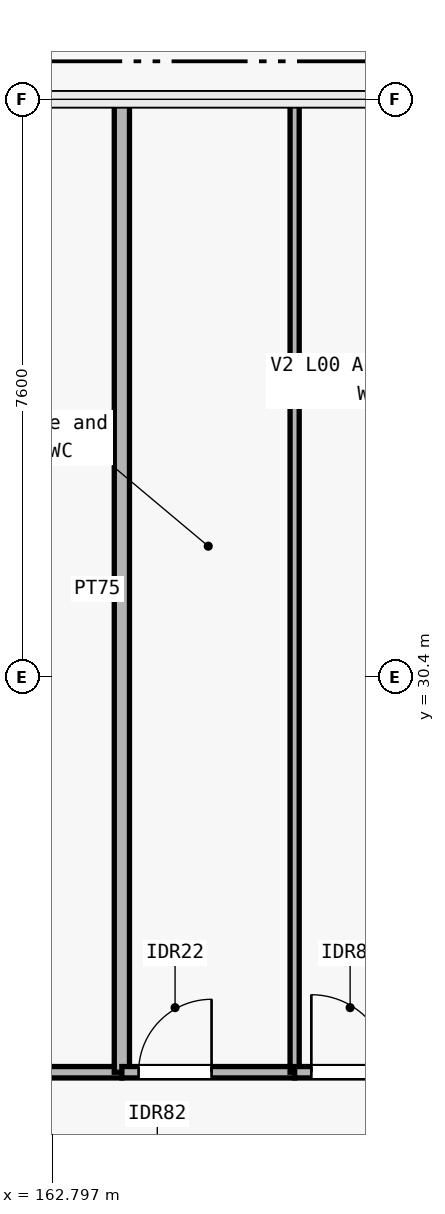
"""IFC4 building model, lengths in metres.
Left out: names, types, materials, properties, quantities, classifications, styles, units other than length and angle.
Written with IfcOpenShell. Run it as: python <this file> out.ifc"""

import sys

from ifc_helpers import new_model, si_unit, direction, frame, frame_2d, origin, place, context, subcontext, project, spatial, rectangle, extrude, element, fill, save


model = new_model("IFC4")
c1 = context("Model", 3, precision=1e-05, world=origin(), true_north=direction((0.0, 1.0)))
c2 = subcontext(c1, "Body", "Model", "MODEL_VIEW")
j1 = project(units=[si_unit("LENGTHUNIT", "METRE"), si_unit("PLANEANGLEUNIT", "RADIAN")], contexts=[c1])
p1 = place(None, origin())
s1 = spatial("IfcSite", under=j1, at=p1, CompositionType="ELEMENT")
p2 = place(p1, origin())
s2 = spatial("IfcBuilding", under=s1, at=p2, CompositionType="ELEMENT")
p3 = place(p2, origin())
s3 = spatial("IfcBuildingStorey", under=s2, at=p3, CompositionType="ELEMENT", Elevation=0.0)
p4 = place(p3, frame((155.033, 25.2, 0.0), z_axis=(0.0, 0.0, 1.0), x_axis=(1.0, 0.0, 0.0)))
e1 = element("IfcWall", 1, at=p4, inside=s3, PredefinedType="PARTITIONING", context=c2, shape_type="SweptSolid", body=[
    extrude(rectangle(XDim=8.68, YDim=0.15, at=frame_2d((4.34, 0.0))), origin(), (0.0, 0.0, 1.0), 4.275),
])
p5 = place(p4, frame((0.22, 0.0, 0.0)))
e2 = element("IfcOpeningElement", 2, at=p5, cuts=e1, PredefinedType="OPENING", context=c2, shape_type="SweptSolid", body=[
    extrude(rectangle(XDim=0.9, YDim=2.1, at=frame_2d((0.45, 1.05))), frame((0.0, 0.085, 0.0), z_axis=(0.0, -1.0, 0.0), x_axis=(1.0, 0.0, 0.0)), (0.0, 0.0, 1.0), 0.17),
])
p6 = place(p3, frame((163.713, 25.2, 0.0), z_axis=(0.0, 0.0, 1.0), x_axis=(0.0, 1.0, 0.0)))
e3 = element("IfcWall", 3, at=p6, inside=s3, PredefinedType="PARTITIONING", context=c2, shape_type="SweptSolid", body=[
    extrude(rectangle(XDim=12.72, YDim=0.2, at=frame_2d((6.36, 0.0))), origin(), (0.0, 0.0, 1.0), 4.325),
])
p7 = place(p3, frame((163.713, 25.2, 0.0), z_axis=(0.0, 0.0, 1.0), x_axis=(1.0, 0.0, 0.0)))
e4 = element("IfcWall", 4, at=p7, inside=s3, PredefinedType="PARTITIONING", context=c2, shape_type="SweptSolid", body=[
    extrude(rectangle(XDim=2.273, YDim=0.15, at=frame_2d((1.137, 0.0))), origin(), (0.0, 0.0, 1.0), 4.485),
])
p8 = place(p7, frame((0.22, 0.0, 0.0)))
e5 = element("IfcOpeningElement", 5, at=p8, cuts=e4, PredefinedType="OPENING", context=c2, shape_type="SweptSolid", body=[
    extrude(rectangle(XDim=0.96, YDim=2.1, at=frame_2d((0.48, 1.05))), frame((0.0, 0.085, 0.0), z_axis=(0.0, -1.0, 0.0), x_axis=(1.0, 0.0, 0.0)), (0.0, 0.0, 1.0), 0.17),
])
p9 = place(p3, frame((165.986, 25.2, 0.0), z_axis=(0.0, 0.0, 1.0), x_axis=(0.0, 1.0, 0.0)))
e6 = element("IfcWall", 6, at=p9, inside=s3, PredefinedType="PARTITIONING", context=c2, shape_type="SweptSolid", body=[
    extrude(rectangle(XDim=12.72, YDim=0.12, at=frame_2d((6.36, 0.0))), origin(), (0.0, 0.0, 1.0), 4.325),
])
p10 = place(p3, frame((165.986, 25.2, 0.0), z_axis=(0.0, 0.0, 1.0), x_axis=(1.0, 0.0, 0.0)))
e7 = element("IfcWall", 7, at=p10, inside=s3, PredefinedType="PARTITIONING", context=c2, shape_type="SweptSolid", body=[
    extrude(rectangle(XDim=1.964, YDim=0.15, at=frame_2d((0.982, 0.0))), origin(), (0.0, 0.0, 1.0), 4.45),
])
p11 = place(p10, frame((0.22, 0.0, 0.0)))
e8 = element("IfcOpeningElement", 8, at=p11, cuts=e7, PredefinedType="OPENING", context=c2, shape_type="SweptSolid", body=[
    extrude(rectangle(XDim=1.02, YDim=2.1, at=frame_2d((0.51, 1.05))), frame((0.0, 0.085, 0.0), z_axis=(0.0, -1.0, 0.0), x_axis=(1.0, 0.0, 0.0)), (0.0, 0.0, 1.0), 0.17),
])
p12 = place(p8, origin())
e9 = element("IfcDoor", 9, at=p12, inside=s3, OperationType="SINGLE_SWING_RIGHT", PredefinedType="DOOR", context=c2, shape_type="SweptSolid", body=[
    extrude(rectangle(XDim=0.96, YDim=2.1, at=frame_2d((0.48, 1.05))), frame((0.0, 0.025, 0.0), z_axis=(0.0, -1.0, 0.0), x_axis=(1.0, 0.0, 0.0)), (0.0, 0.0, 1.0), 0.05),
])
fill(e5, e9)
p13 = place(p11, origin())
e10 = element("IfcDoor", 10, at=p13, inside=s3, OperationType="SINGLE_SWING_LEFT", PredefinedType="DOOR", context=c2, shape_type="SweptSolid", body=[
    extrude(rectangle(XDim=1.02, YDim=2.1, at=frame_2d((0.51, 1.05))), frame((0.0, 0.025, 0.0), z_axis=(0.0, -1.0, 0.0), x_axis=(1.0, 0.0, 0.0)), (0.0, 0.0, 1.0), 0.05),
])
fill(e8, e10)
save(model, sys.argv[1])
